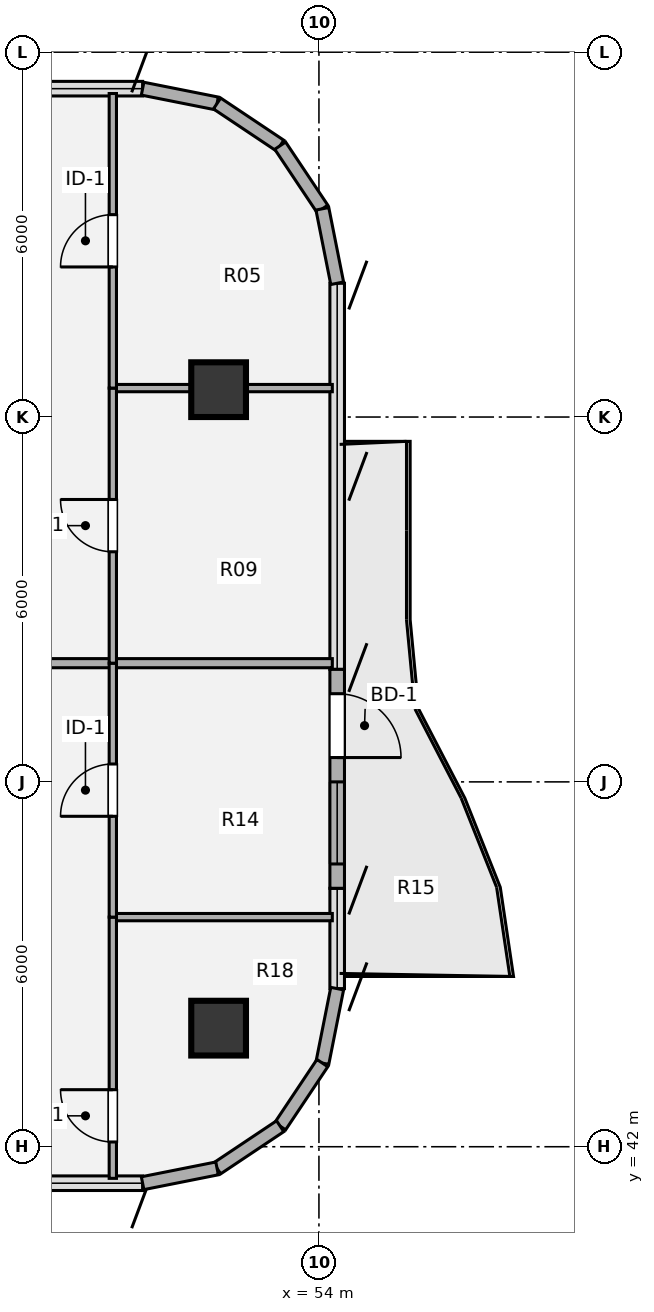
"""IFC4 building model, lengths in metres.
Left out: names, types, materials, properties, quantities, classifications, styles, units other than length and angle.
Written with IfcOpenShell. Run it as: python <this file> out.ifc"""

import sys

from ifc_helpers import new_model, si_unit, direction, frame, frame_2d, origin, origin_2d, place, context, subcontext, project, spatial, rectangle, hollow_circle, extrude, source, transform, mapped, element, fill, save


model = new_model("IFC4")
c1 = context("Model", 3, precision=1e-05, world=origin(), true_north=direction((0.0, 1.0)))
c2 = subcontext(c1, "Body", "Model", "MODEL_VIEW")
j1 = project(units=[si_unit("LENGTHUNIT", "METRE"), si_unit("PLANEANGLEUNIT", "RADIAN")], contexts=[c1])
p1 = place(None, origin())
s1 = spatial("IfcSite", under=j1, at=p1, CompositionType="ELEMENT")
p2 = place(p1, origin())
s2 = spatial("IfcBuilding", under=s1, at=p2, CompositionType="ELEMENT")
p3 = place(p2, frame((0.0, 0.0, 230.58)))
s3 = spatial("IfcBuildingStorey", under=s2, at=p3, CompositionType="ELEMENT", Elevation=230.58)
m1 = source(origin(), c2, "Body", "SweptSolid", [
    extrude(hollow_circle(Radius=0.45, WallThickness=0.032, at=origin_2d()), origin(), (0.0, 0.0, 1.0), 3.78),
])
for number, where, z_axis, x_axis in (
    (1, (52.35, 43.95, 0.0), (0.0, 0.0, 1.0), (1.0, 0.0, 0.0)),
    (2, (52.35, 54.45, 0.0), (0.0, 0.0, 1.0), (1.0, 0.0, 0.0)),
):
    element("IfcColumn", number, at=place(p3, frame(where, z_axis=z_axis, x_axis=x_axis)), inside=s3, PredefinedType="COLUMN", context=c2, shape_type="MappedRepresentation", body=[
        mapped(m1, transform((0.0, 0.0, 0.0), x_axis=(1.0, 0.0, 0.0), y_axis=(0.0, 1.0, 0.0), z_axis=(0.0, 0.0, 1.0), scale=1.0)),
    ])
for number, where, z_axis, x_axis in (
    (3, (51.1, 59.4, 0.0), (0.0, 0.0, 1.0), (0.981, -0.195, 0.0)),
    (4, (52.325, 59.156, 0.0), (0.0, 0.0, 1.0), (0.831, -0.556, 0.0)),
    (5, (53.363, 58.463, 0.0), (0.0, 0.0, 1.0), (0.556, -0.831, 0.0)),
    (6, (54.056, 57.425, 0.0), (0.0, 0.0, 1.0), (0.195, -0.981, 0.0)),
):
    element("IfcWall", number, at=place(p3, frame(where, z_axis=z_axis, x_axis=x_axis)), inside=s3, PredefinedType="SOLIDWALL", context=c2, shape_type="SweptSolid", body=[
        extrude(rectangle(XDim=1.249, YDim=0.215, at=frame_2d((0.624, 0.0))), origin(), (0.0, 0.0, 1.0), 3.53),
    ])
p4 = place(p3, frame((54.3, 49.85, 0.0), z_axis=(0.0, 0.0, 1.0), x_axis=(0.0, -1.0, 0.0)))
e7 = element("IfcWall", 7, at=p4, inside=s3, PredefinedType="SOLIDWALL", context=c2, shape_type="SweptSolid", body=[
    extrude(rectangle(XDim=3.6, YDim=0.24, at=frame_2d((1.8, 0.0))), origin(), (0.0, 0.0, 1.0), 3.53),
])
p5 = place(p4, frame((0.4, 0.0, 0.0)))
e8 = element("IfcOpeningElement", 8, at=p5, cuts=e7, PredefinedType="OPENING", context=c2, shape_type="SweptSolid", body=[
    extrude(rectangle(XDim=1.05, YDim=2.15, at=origin_2d()), frame((0.525, 0.13, 1.075), z_axis=(0.0, -1.0, 0.0), x_axis=(1.0, 0.0, 0.0)), (0.0, 0.0, 1.0), 0.26),
])
p6 = place(p4, frame((1.85, 0.0, 0.85)))
e9 = element("IfcOpeningElement", 9, at=p6, cuts=e7, PredefinedType="OPENING", context=c2, shape_type="SweptSolid", body=[
    extrude(rectangle(XDim=1.35, YDim=1.35, at=origin_2d()), frame((0.675, 0.13, 0.675), z_axis=(0.0, -1.0, 0.0), x_axis=(1.0, 0.0, 0.0)), (0.0, 0.0, 1.0), 0.26),
])
for number, where, z_axis, x_axis in (
    (10, (54.3, 44.6, 0.0), (0.0, 0.0, 1.0), (-0.195, -0.981, 0.0)),
    (11, (54.056, 43.375, 0.0), (0.0, 0.0, 1.0), (-0.556, -0.831, 0.0)),
    (12, (53.363, 42.337, 0.0), (0.0, 0.0, 1.0), (-0.831, -0.556, 0.0)),
    (13, (52.325, 41.644, 0.0), (0.0, 0.0, 1.0), (-0.981, -0.195, 0.0)),
):
    element("IfcWall", number, at=place(p3, frame(where, z_axis=z_axis, x_axis=x_axis)), inside=s3, PredefinedType="SOLIDWALL", context=c2, shape_type="SweptSolid", body=[
        extrude(rectangle(XDim=1.249, YDim=0.215, at=frame_2d((0.624, 0.0))), origin(), (0.0, 0.0, 1.0), 3.53),
    ])
p7 = place(p3, frame((50.61, 45.776, 0.0), z_axis=(0.0, 0.0, 1.0), x_axis=(1.0, 0.0, 0.0)))
e14 = element("IfcWall", 14, at=p7, inside=s3, PredefinedType="PARTITIONING", context=c2, shape_type="SweptSolid", body=[
    extrude(rectangle(XDim=3.61, YDim=0.12, at=frame_2d((1.805, 0.0))), origin(), (0.0, 0.0, 1.0), 2.982),
])
p8 = place(p3, frame((38.45, 49.952, 0.0), z_axis=(0.0, 0.0, 1.0), x_axis=(1.0, 0.0, 0.0)))
e15 = element("IfcWall", 15, at=p8, inside=s3, PredefinedType="PARTITIONING", context=c2, shape_type="SweptSolid", body=[
    extrude(rectangle(XDim=15.77, YDim=0.15, at=frame_2d((7.885, 0.0))), origin(), (0.0, 0.0, 1.0), 2.982),
])
p9 = place(p3, frame((50.61, 54.476, 0.0), z_axis=(0.0, 0.0, 1.0), x_axis=(1.0, 0.0, 0.0)))
e16 = element("IfcWall", 16, at=p9, inside=s3, PredefinedType="PARTITIONING", context=c2, shape_type="SweptSolid", body=[
    extrude(rectangle(XDim=3.61, YDim=0.12, at=frame_2d((1.805, 0.0))), origin(), (0.0, 0.0, 1.0), 2.903),
])
p10 = place(p3, frame((50.61, 41.48, 0.0), z_axis=(0.0, 0.0, 1.0), x_axis=(0.0, 1.0, 0.0)))
e17 = element("IfcWall", 17, at=p10, inside=s3, PredefinedType="PARTITIONING", context=c2, shape_type="SweptSolid", body=[
    extrude(rectangle(XDim=4.296, YDim=0.12, at=frame_2d((2.148, 0.0))), origin(), (0.0, 0.0, 1.0), 3.5),
])
p11 = place(p10, frame((0.598, 0.0, 0.0)))
e18 = element("IfcOpeningElement", 18, at=p11, cuts=e17, PredefinedType="OPENING", context=c2, shape_type="SweptSolid", body=[
    extrude(rectangle(XDim=0.86, YDim=2.1, at=origin_2d()), frame((0.43, 0.07, 1.05), z_axis=(0.0, -1.0, 0.0), x_axis=(1.0, 0.0, 0.0)), (0.0, 0.0, 1.0), 0.14),
])
p12 = place(p3, frame((50.61, 45.776, 0.0), z_axis=(0.0, 0.0, 1.0), x_axis=(0.0, 1.0, 0.0)))
e19 = element("IfcWall", 19, at=p12, inside=s3, PredefinedType="PARTITIONING", context=c2, shape_type="SweptSolid", body=[
    extrude(rectangle(XDim=4.176, YDim=0.12, at=frame_2d((2.088, 0.0))), origin(), (0.0, 0.0, 1.0), 3.5),
])
p13 = place(p12, frame((1.658, 0.0, 0.0)))
e20 = element("IfcOpeningElement", 20, at=p13, cuts=e19, PredefinedType="OPENING", context=c2, shape_type="SweptSolid", body=[
    extrude(rectangle(XDim=0.86, YDim=2.1, at=origin_2d()), frame((0.43, 0.07, 1.05), z_axis=(0.0, -1.0, 0.0), x_axis=(1.0, 0.0, 0.0)), (0.0, 0.0, 1.0), 0.14),
])
p14 = place(p3, frame((50.61, 49.952, 0.0), z_axis=(0.0, 0.0, 1.0), x_axis=(0.0, 1.0, 0.0)))
e21 = element("IfcWall", 21, at=p14, inside=s3, PredefinedType="PARTITIONING", context=c2, shape_type="SweptSolid", body=[
    extrude(rectangle(XDim=4.524, YDim=0.12, at=frame_2d((2.262, 0.0))), origin(), (0.0, 0.0, 1.0), 3.5),
])
p15 = place(p14, frame((1.832, 0.0, 0.0)))
e22 = element("IfcOpeningElement", 22, at=p15, cuts=e21, PredefinedType="OPENING", context=c2, shape_type="SweptSolid", body=[
    extrude(rectangle(XDim=0.86, YDim=2.1, at=origin_2d()), frame((0.43, 0.07, 1.05), z_axis=(0.0, -1.0, 0.0), x_axis=(1.0, 0.0, 0.0)), (0.0, 0.0, 1.0), 0.14),
])
p16 = place(p3, frame((50.61, 54.476, 0.0), z_axis=(0.0, 0.0, 1.0), x_axis=(0.0, 1.0, 0.0)))
e23 = element("IfcWall", 23, at=p16, inside=s3, PredefinedType="PARTITIONING", context=c2, shape_type="SweptSolid", body=[
    extrude(rectangle(XDim=4.844, YDim=0.12, at=frame_2d((2.422, 0.0))), origin(), (0.0, 0.0, 1.0), 3.5),
])
p17 = place(p16, frame((1.992, 0.0, 0.0)))
e24 = element("IfcOpeningElement", 24, at=p17, cuts=e23, PredefinedType="OPENING", context=c2, shape_type="SweptSolid", body=[
    extrude(rectangle(XDim=0.86, YDim=2.1, at=origin_2d()), frame((0.43, 0.07, 1.05), z_axis=(0.0, -1.0, 0.0), x_axis=(1.0, 0.0, 0.0)), (0.0, 0.0, 1.0), 0.14),
])
m2 = source(origin(), c2, "Body", "SweptSolid", [
    extrude(rectangle(XDim=1.05, YDim=2.15, at=origin_2d()), frame((0.525, 0.025, 1.075), z_axis=(0.0, -1.0, 0.0), x_axis=(1.0, 0.0, 0.0)), (0.0, 0.0, 1.0), 0.05),
])
p18 = place(p5, origin())
e25 = element("IfcDoor", 25, at=p18, inside=s3, OperationType="SINGLE_SWING_RIGHT", PredefinedType="DOOR", context=c2, shape_type="MappedRepresentation", body=[
    mapped(m2, transform((0.0, 0.0, 0.0), x_axis=(1.0, 0.0, 0.0), y_axis=(0.0, 1.0, 0.0), z_axis=(0.0, 0.0, 1.0), scale=1.0)),
])
fill(e8, e25)
m3 = source(origin(), c2, "Body", "SweptSolid", [
    extrude(rectangle(XDim=1.35, YDim=1.35, at=origin_2d()), frame((0.675, 0.03, 0.675), z_axis=(0.0, -1.0, 0.0), x_axis=(1.0, 0.0, 0.0)), (0.0, 0.0, 1.0), 0.06),
])
p19 = place(p6, origin())
e26 = element("IfcWindow", 26, at=p19, inside=s3, PartitioningType="SINGLE_PANEL", PredefinedType="WINDOW", context=c2, shape_type="MappedRepresentation", body=[
    mapped(m3, transform((0.0, 0.0, 0.0), x_axis=(1.0, 0.0, 0.0), y_axis=(0.0, 1.0, 0.0), z_axis=(0.0, 0.0, 1.0), scale=1.0)),
])
fill(e9, e26)
m4 = source(origin(), c2, "Body", "SweptSolid", [
    extrude(rectangle(XDim=0.86, YDim=2.1, at=origin_2d()), frame((0.43, 0.025, 1.05), z_axis=(0.0, -1.0, 0.0), x_axis=(1.0, 0.0, 0.0)), (0.0, 0.0, 1.0), 0.05),
])
p20 = place(p11, origin())
e27 = element("IfcDoor", 27, at=p20, inside=s3, OperationType="SINGLE_SWING_RIGHT", PredefinedType="DOOR", context=c2, shape_type="MappedRepresentation", body=[
    mapped(m4, transform((0.0, 0.0, 0.0), x_axis=(1.0, 0.0, 0.0), y_axis=(0.0, 1.0, 0.0), z_axis=(0.0, 0.0, 1.0), scale=1.0)),
])
fill(e18, e27)
p21 = place(p13, origin())
e28 = element("IfcDoor", 28, at=p21, inside=s3, OperationType="SINGLE_SWING_LEFT", PredefinedType="DOOR", context=c2, shape_type="MappedRepresentation", body=[
    mapped(m4, transform((0.0, 0.0, 0.0), x_axis=(1.0, 0.0, 0.0), y_axis=(0.0, 1.0, 0.0), z_axis=(0.0, 0.0, 1.0), scale=1.0)),
])
fill(e20, e28)
p22 = place(p15, origin())
e29 = element("IfcDoor", 29, at=p22, inside=s3, OperationType="SINGLE_SWING_RIGHT", PredefinedType="DOOR", context=c2, shape_type="MappedRepresentation", body=[
    mapped(m4, transform((0.0, 0.0, 0.0), x_axis=(1.0, 0.0, 0.0), y_axis=(0.0, 1.0, 0.0), z_axis=(0.0, 0.0, 1.0), scale=1.0)),
])
fill(e22, e29)
p23 = place(p17, origin())
e30 = element("IfcDoor", 30, at=p23, inside=s3, OperationType="SINGLE_SWING_LEFT", PredefinedType="DOOR", context=c2, shape_type="MappedRepresentation", body=[
    mapped(m4, transform((0.0, 0.0, 0.0), x_axis=(1.0, 0.0, 0.0), y_axis=(0.0, 1.0, 0.0), z_axis=(0.0, 0.0, 1.0), scale=1.0)),
])
fill(e24, e30)
save(model, sys.argv[1])
